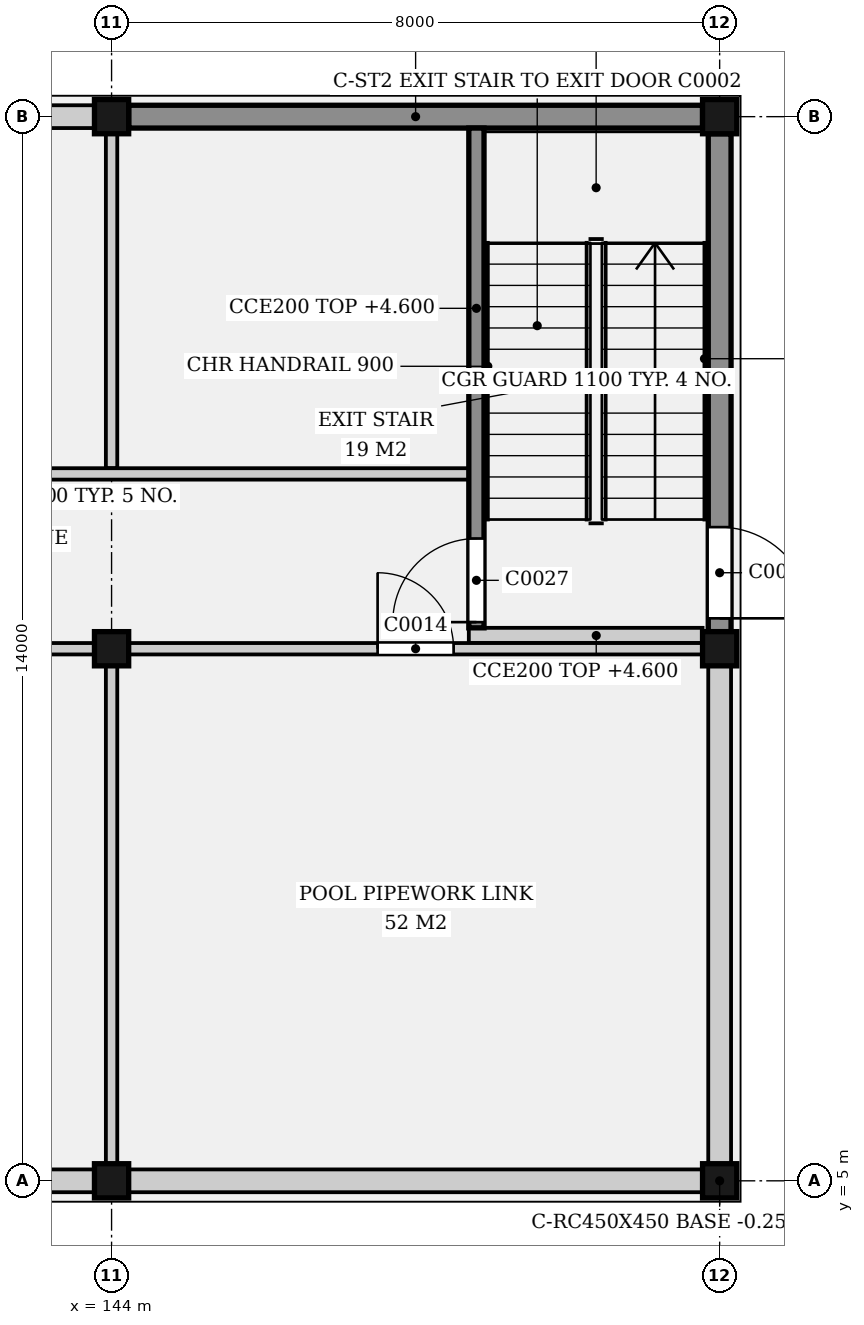
"""IFC4 building model, lengths in metres.
Left out: names, types, materials, properties, quantities, classifications, styles, units other than length and angle.
Written with IfcOpenShell. Run it as: python <this file> out.ifc"""

import sys

from ifc_helpers import new_model, si_unit, direction, frame, frame_2d, origin, origin_2d, place, context, subcontext, project, spatial, rectangle, extrude, element, fill, save


model = new_model("IFC4")
c1 = context("Model", 3, precision=1e-05, world=origin(), true_north=direction((0.0, 1.0)))
c2 = subcontext(c1, "Body", "Model", "MODEL_VIEW")
j1 = project(units=[si_unit("LENGTHUNIT", "METRE"), si_unit("PLANEANGLEUNIT", "RADIAN")], contexts=[c1])
p1 = place(None, origin())
s1 = spatial("IfcSite", under=j1, at=p1, CompositionType="ELEMENT")
p2 = place(p1, origin())
s2 = spatial("IfcBuilding", under=s1, at=p2, CompositionType="ELEMENT")
p3 = place(p2, origin())
s3 = spatial("IfcBuildingStorey", under=s2, at=p3, CompositionType="ELEMENT", Elevation=0.0)
for number, where, z_axis, x_axis in (
    (1, (144.0, 5.0, -0.25), (0.0, 0.0, 1.0), (1.0, 0.0, 0.0)),
    (2, (144.0, 12.0, -0.25), (0.0, 0.0, 1.0), (1.0, 0.0, 0.0)),
    (3, (144.0, 19.0, -0.25), (0.0, 0.0, 1.0), (1.0, 0.0, 0.0)),
    (4, (152.0, 5.0, -0.25), (0.0, 0.0, 1.0), (1.0, 0.0, 0.0)),
    (5, (152.0, 12.0, -0.25), (0.0, 0.0, 1.0), (1.0, 0.0, 0.0)),
    (6, (152.0, 19.0, -0.25), (0.0, 0.0, 1.0), (1.0, 0.0, 0.0)),
):
    element("IfcColumn", number, at=place(p3, frame(where, z_axis=z_axis, x_axis=x_axis)), inside=s3, PredefinedType="COLUMN", context=c2, shape_type="SweptSolid", body=[
        extrude(rectangle(XDim=0.45, YDim=0.45, at=origin_2d()), origin(), (0.0, 0.0, 1.0), 5.25),
    ])
p4 = place(p3, frame((132.225, 5.0, 0.0), z_axis=(0.0, 0.0, 1.0), x_axis=(1.0, 0.0, 0.0)))
e7 = element("IfcWall", 7, at=p4, inside=s3, PredefinedType="ELEMENTEDWALL", context=c2, shape_type="SweptSolid", body=[
    extrude(rectangle(XDim=11.55, YDim=0.3, at=frame_2d((5.775, 0.0))), origin(), (0.0, 0.0, 1.0), 4.6),
])
p5 = place(p4, frame((1.458, 0.0, 2.5)))
e8 = element("IfcOpeningElement", 8, at=p5, cuts=e7, PredefinedType="OPENING", context=c2, shape_type="SweptSolid", body=[
    extrude(rectangle(XDim=1.6, YDim=1.0, at=frame_2d((0.8, 0.5))), frame((0.0, 0.16, 0.0), z_axis=(0.0, -1.0, 0.0), x_axis=(1.0, 0.0, 0.0)), (0.0, 0.0, 1.0), 0.32),
])
p6 = place(p4, frame((4.975, 0.0, 2.5)))
e9 = element("IfcOpeningElement", 9, at=p6, cuts=e7, PredefinedType="OPENING", context=c2, shape_type="SweptSolid", body=[
    extrude(rectangle(XDim=1.6, YDim=1.0, at=frame_2d((0.8, 0.5))), frame((0.0, 0.16, 0.0), z_axis=(0.0, -1.0, 0.0), x_axis=(1.0, 0.0, 0.0)), (0.0, 0.0, 1.0), 0.32),
])
p7 = place(p4, frame((8.492, 0.0, 2.5)))
e10 = element("IfcOpeningElement", 10, at=p7, cuts=e7, PredefinedType="OPENING", context=c2, shape_type="SweptSolid", body=[
    extrude(rectangle(XDim=1.6, YDim=1.0, at=frame_2d((0.8, 0.5))), frame((0.0, 0.16, 0.0), z_axis=(0.0, -1.0, 0.0), x_axis=(1.0, 0.0, 0.0)), (0.0, 0.0, 1.0), 0.32),
])
p8 = place(p3, frame((144.225, 5.0, 0.0), z_axis=(0.0, 0.0, 1.0), x_axis=(1.0, 0.0, 0.0)))
e11 = element("IfcWall", 11, at=p8, inside=s3, PredefinedType="ELEMENTEDWALL", context=c2, shape_type="SweptSolid", body=[
    extrude(rectangle(XDim=7.55, YDim=0.3, at=frame_2d((3.775, 0.0))), origin(), (0.0, 0.0, 1.0), 4.6),
])
p9 = place(p3, frame((132.225, 19.0, 0.0), z_axis=(0.0, 0.0, 1.0), x_axis=(1.0, 0.0, 0.0)))
e12 = element("IfcWall", 12, at=p9, inside=s3, PredefinedType="ELEMENTEDWALL", context=c2, shape_type="SweptSolid", body=[
    extrude(rectangle(XDim=11.55, YDim=0.3, at=frame_2d((5.775, 0.0))), origin(), (0.0, 0.0, 1.0), 4.6),
])
p10 = place(p9, frame((1.458, 0.0, 2.5)))
e13 = element("IfcOpeningElement", 13, at=p10, cuts=e12, PredefinedType="OPENING", context=c2, shape_type="SweptSolid", body=[
    extrude(rectangle(XDim=1.6, YDim=1.0, at=frame_2d((0.8, 0.5))), frame((0.0, 0.16, 0.0), z_axis=(0.0, -1.0, 0.0), x_axis=(1.0, 0.0, 0.0)), (0.0, 0.0, 1.0), 0.32),
])
p11 = place(p9, frame((8.492, 0.0, 2.5)))
e14 = element("IfcOpeningElement", 14, at=p11, cuts=e12, PredefinedType="OPENING", context=c2, shape_type="SweptSolid", body=[
    extrude(rectangle(XDim=1.6, YDim=1.0, at=frame_2d((0.8, 0.5))), frame((0.0, 0.16, 0.0), z_axis=(0.0, -1.0, 0.0), x_axis=(1.0, 0.0, 0.0)), (0.0, 0.0, 1.0), 0.32),
])
p12 = place(p9, frame((4.875, 0.0, 0.0)))
e15 = element("IfcOpeningElement", 15, at=p12, cuts=e12, PredefinedType="OPENING", context=c2, shape_type="SweptSolid", body=[
    extrude(rectangle(XDim=1.8, YDim=2.4, at=frame_2d((0.9, 1.2))), frame((0.0, 0.16, 0.0), z_axis=(0.0, -1.0, 0.0), x_axis=(1.0, 0.0, 0.0)), (0.0, 0.0, 1.0), 0.32),
])
p13 = place(p3, frame((144.225, 19.0, 0.0), z_axis=(0.0, 0.0, 1.0), x_axis=(1.0, 0.0, 0.0)))
e16 = element("IfcWall", 16, at=p13, inside=s3, PredefinedType="ELEMENTEDWALL", context=c2, shape_type="SweptSolid", body=[
    extrude(rectangle(XDim=7.55, YDim=0.3, at=frame_2d((3.775, 0.0))), origin(), (0.0, 0.0, 1.0), 4.6),
])
p14 = place(p3, frame((152.0, 5.225, 0.0), z_axis=(0.0, 0.0, 1.0), x_axis=(0.0, 1.0, 0.0)))
e17 = element("IfcWall", 17, at=p14, inside=s3, PredefinedType="ELEMENTEDWALL", context=c2, shape_type="SweptSolid", body=[
    extrude(rectangle(XDim=6.55, YDim=0.3, at=frame_2d((3.275, 0.0))), origin(), (0.0, 0.0, 1.0), 4.6),
])
p15 = place(p3, frame((152.0, 12.225, 0.0), z_axis=(0.0, 0.0, 1.0), x_axis=(0.0, 1.0, 0.0)))
e18 = element("IfcWall", 18, at=p15, inside=s3, PredefinedType="ELEMENTEDWALL", context=c2, shape_type="SweptSolid", body=[
    extrude(rectangle(XDim=6.55, YDim=0.3, at=frame_2d((3.275, 0.0))), origin(), (0.0, 0.0, 1.0), 4.6),
])
p16 = place(p15, frame((1.375, 0.0, 0.0), z_axis=(0.0, 0.0, 1.0), x_axis=(-1.0, 0.0, 0.0)))
e19 = element("IfcOpeningElement", 19, at=p16, cuts=e18, PredefinedType="OPENING", context=c2, shape_type="SweptSolid", body=[
    extrude(rectangle(XDim=1.2, YDim=2.1, at=frame_2d((0.6, 1.05))), frame((0.0, 0.16, 0.0), z_axis=(0.0, -1.0, 0.0), x_axis=(1.0, 0.0, 0.0)), (0.0, 0.0, 1.0), 0.32),
])
p17 = place(p3, frame((132.225, 12.0, 0.0), z_axis=(0.0, 0.0, 1.0), x_axis=(1.0, 0.0, 0.0)))
e20 = element("IfcWall", 20, at=p17, inside=s3, PredefinedType="PARTITIONING", context=c2, shape_type="SweptSolid", body=[
    extrude(rectangle(XDim=11.55, YDim=0.15, at=frame_2d((5.775, 0.0))), origin(), (0.0, 0.0, 1.0), 4.6),
])
p18 = place(p17, frame((4.875, 0.0, 0.0)))
e21 = element("IfcOpeningElement", 21, at=p18, cuts=e20, PredefinedType="OPENING", context=c2, shape_type="SweptSolid", body=[
    extrude(rectangle(XDim=1.8, YDim=2.4, at=frame_2d((0.9, 1.2))), frame((0.0, 0.085, 0.0), z_axis=(0.0, -1.0, 0.0), x_axis=(1.0, 0.0, 0.0)), (0.0, 0.0, 1.0), 0.17),
])
p19 = place(p3, frame((144.225, 12.0, 0.0), z_axis=(0.0, 0.0, 1.0), x_axis=(1.0, 0.0, 0.0)))
e22 = element("IfcWall", 22, at=p19, inside=s3, PredefinedType="PARTITIONING", context=c2, shape_type="SweptSolid", body=[
    extrude(rectangle(XDim=7.55, YDim=0.15, at=frame_2d((3.775, 0.0))), origin(), (0.0, 0.0, 1.0), 4.6),
])
p20 = place(p19, frame((3.275, 0.0, 0.0)))
e23 = element("IfcOpeningElement", 23, at=p20, cuts=e22, PredefinedType="OPENING", context=c2, shape_type="SweptSolid", body=[
    extrude(rectangle(XDim=1.0, YDim=2.1, at=frame_2d((0.5, 1.05))), frame((0.0, 0.085, 0.0), z_axis=(0.0, -1.0, 0.0), x_axis=(1.0, 0.0, 0.0)), (0.0, 0.0, 1.0), 0.17),
])
p21 = place(p3, frame((55.3, 14.3, 0.0), z_axis=(0.0, 0.0, 1.0), x_axis=(1.0, 0.0, 0.0)))
e24 = element("IfcWall", 24, at=p21, inside=s3, PredefinedType="PARTITIONING", context=c2, shape_type="SweptSolid", body=[
    extrude(rectangle(XDim=93.4, YDim=0.15, at=frame_2d((46.7, 0.0))), origin(), (0.0, 0.0, 1.0), 4.6),
])
p22 = place(p21, frame((15.8, 0.0, 0.0)))
e25 = element("IfcOpeningElement", 25, at=p22, cuts=e24, PredefinedType="OPENING", context=c2, shape_type="SweptSolid", body=[
    extrude(rectangle(XDim=1.8, YDim=2.4, at=frame_2d((0.9, 1.2))), frame((0.0, 0.085, 0.0), z_axis=(0.0, -1.0, 0.0), x_axis=(1.0, 0.0, 0.0)), (0.0, 0.0, 1.0), 0.17),
])
p23 = place(p21, frame((32.2, 0.0, 0.0)))
e26 = element("IfcOpeningElement", 26, at=p23, cuts=e24, PredefinedType="OPENING", context=c2, shape_type="SweptSolid", body=[
    extrude(rectangle(XDim=1.0, YDim=2.1, at=frame_2d((0.5, 1.05))), frame((0.0, 0.085, 0.0), z_axis=(0.0, -1.0, 0.0), x_axis=(1.0, 0.0, 0.0)), (0.0, 0.0, 1.0), 0.17),
])
p24 = place(p21, frame((38.2, 0.0, 0.0)))
e27 = element("IfcOpeningElement", 27, at=p24, cuts=e24, PredefinedType="OPENING", context=c2, shape_type="SweptSolid", body=[
    extrude(rectangle(XDim=1.0, YDim=2.1, at=frame_2d((0.5, 1.05))), frame((0.0, 0.085, 0.0), z_axis=(0.0, -1.0, 0.0), x_axis=(1.0, 0.0, 0.0)), (0.0, 0.0, 1.0), 0.17),
])
p25 = place(p21, frame((43.2, 0.0, 0.0)))
e28 = element("IfcOpeningElement", 28, at=p25, cuts=e24, PredefinedType="OPENING", context=c2, shape_type="SweptSolid", body=[
    extrude(rectangle(XDim=1.0, YDim=2.1, at=frame_2d((0.5, 1.05))), frame((0.0, 0.085, 0.0), z_axis=(0.0, -1.0, 0.0), x_axis=(1.0, 0.0, 0.0)), (0.0, 0.0, 1.0), 0.17),
])
p26 = place(p21, frame((49.2, 0.0, 0.0)))
e29 = element("IfcOpeningElement", 29, at=p26, cuts=e24, PredefinedType="OPENING", context=c2, shape_type="SweptSolid", body=[
    extrude(rectangle(XDim=1.0, YDim=2.1, at=frame_2d((0.5, 1.05))), frame((0.0, 0.085, 0.0), z_axis=(0.0, -1.0, 0.0), x_axis=(1.0, 0.0, 0.0)), (0.0, 0.0, 1.0), 0.17),
])
p27 = place(p21, frame((57.8, 0.0, 0.0)))
e30 = element("IfcOpeningElement", 30, at=p27, cuts=e24, PredefinedType="OPENING", context=c2, shape_type="SweptSolid", body=[
    extrude(rectangle(XDim=1.8, YDim=2.4, at=frame_2d((0.9, 1.2))), frame((0.0, 0.085, 0.0), z_axis=(0.0, -1.0, 0.0), x_axis=(1.0, 0.0, 0.0)), (0.0, 0.0, 1.0), 0.17),
])
p28 = place(p21, frame((69.8, 0.0, 0.0)))
e31 = element("IfcOpeningElement", 31, at=p28, cuts=e24, PredefinedType="OPENING", context=c2, shape_type="SweptSolid", body=[
    extrude(rectangle(XDim=1.8, YDim=2.4, at=frame_2d((0.9, 1.2))), frame((0.0, 0.085, 0.0), z_axis=(0.0, -1.0, 0.0), x_axis=(1.0, 0.0, 0.0)), (0.0, 0.0, 1.0), 0.17),
])
p29 = place(p21, frame((82.2, 0.0, 0.0)))
e32 = element("IfcOpeningElement", 32, at=p29, cuts=e24, PredefinedType="OPENING", context=c2, shape_type="SweptSolid", body=[
    extrude(rectangle(XDim=1.0, YDim=2.1, at=frame_2d((0.5, 1.05))), frame((0.0, 0.085, 0.0), z_axis=(0.0, -1.0, 0.0), x_axis=(1.0, 0.0, 0.0)), (0.0, 0.0, 1.0), 0.17),
])
p30 = place(p3, frame((144.0, 5.225, 0.0), z_axis=(0.0, 0.0, 1.0), x_axis=(0.0, 1.0, 0.0)))
e33 = element("IfcWall", 33, at=p30, inside=s3, PredefinedType="PARTITIONING", context=c2, shape_type="SweptSolid", body=[
    extrude(rectangle(XDim=6.55, YDim=0.15, at=frame_2d((3.275, 0.0))), origin(), (0.0, 0.0, 1.0), 4.6),
])
p31 = place(p3, frame((144.0, 14.375, 0.0), z_axis=(0.0, 0.0, 1.0), x_axis=(0.0, 1.0, 0.0)))
e34 = element("IfcWall", 34, at=p31, inside=s3, PredefinedType="PARTITIONING", context=c2, shape_type="SweptSolid", body=[
    extrude(rectangle(XDim=4.4, YDim=0.15, at=frame_2d((2.2, 0.0))), origin(), (0.0, 0.0, 1.0), 4.6),
])
p32 = place(p3, frame((148.8, 12.275, 0.0), z_axis=(0.0, 0.0, 1.0), x_axis=(0.0, 1.0, 0.0)))
e35 = element("IfcWall", 35, at=p32, inside=s3, PredefinedType="SOLIDWALL", context=c2, shape_type="SweptSolid", body=[
    extrude(rectangle(XDim=6.575, YDim=0.2, at=frame_2d((3.288, 0.0))), origin(), (0.0, 0.0, 1.0), 4.6),
])
p33 = place(p32, frame((0.075, 0.0, 0.0)))
e36 = element("IfcOpeningElement", 36, at=p33, cuts=e35, PredefinedType="OPENING", context=c2, shape_type="SweptSolid", body=[
    extrude(rectangle(XDim=1.1, YDim=2.1, at=frame_2d((0.55, 1.05))), frame((0.0, 0.11, 0.0), z_axis=(0.0, -1.0, 0.0), x_axis=(1.0, 0.0, 0.0)), (0.0, 0.0, 1.0), 0.22),
])
p34 = place(p3, frame((148.7, 12.175, 0.0), z_axis=(0.0, 0.0, 1.0), x_axis=(1.0, 0.0, 0.0)))
e37 = element("IfcWall", 37, at=p34, inside=s3, PredefinedType="SOLIDWALL", context=c2, shape_type="SweptSolid", body=[
    extrude(rectangle(XDim=3.075, YDim=0.2, at=frame_2d((1.538, 0.0))), origin(), (0.0, 0.0, 1.0), 4.6),
])
p35 = place(p16, origin())
e38 = element("IfcDoor", 38, at=p35, inside=s3, OperationType="SINGLE_SWING_LEFT", PredefinedType="DOOR", context=c2, shape_type="SweptSolid", body=[
    extrude(rectangle(XDim=1.2, YDim=2.1, at=frame_2d((0.6, 1.05))), frame((0.0, 0.025, 0.0), z_axis=(0.0, -1.0, 0.0), x_axis=(1.0, 0.0, 0.0)), (0.0, 0.0, 1.0), 0.05),
])
fill(e19, e38)
p36 = place(p20, origin())
e39 = element("IfcDoor", 39, at=p36, inside=s3, OperationType="SINGLE_SWING_LEFT", PredefinedType="DOOR", context=c2, shape_type="SweptSolid", body=[
    extrude(rectangle(XDim=1.0, YDim=2.1, at=frame_2d((0.5, 1.05))), frame((0.0, 0.025, 0.0), z_axis=(0.0, -1.0, 0.0), x_axis=(1.0, 0.0, 0.0)), (0.0, 0.0, 1.0), 0.05),
])
fill(e23, e39)
p37 = place(p33, origin())
e40 = element("IfcDoor", 40, at=p37, inside=s3, OperationType="SINGLE_SWING_LEFT", PredefinedType="DOOR", context=c2, shape_type="SweptSolid", body=[
    extrude(rectangle(XDim=1.1, YDim=2.1, at=frame_2d((0.55, 1.05))), frame((0.0, 0.025, 0.0), z_axis=(0.0, -1.0, 0.0), x_axis=(1.0, 0.0, 0.0)), (0.0, 0.0, 1.0), 0.05),
])
fill(e36, e40)
save(model, sys.argv[1])
